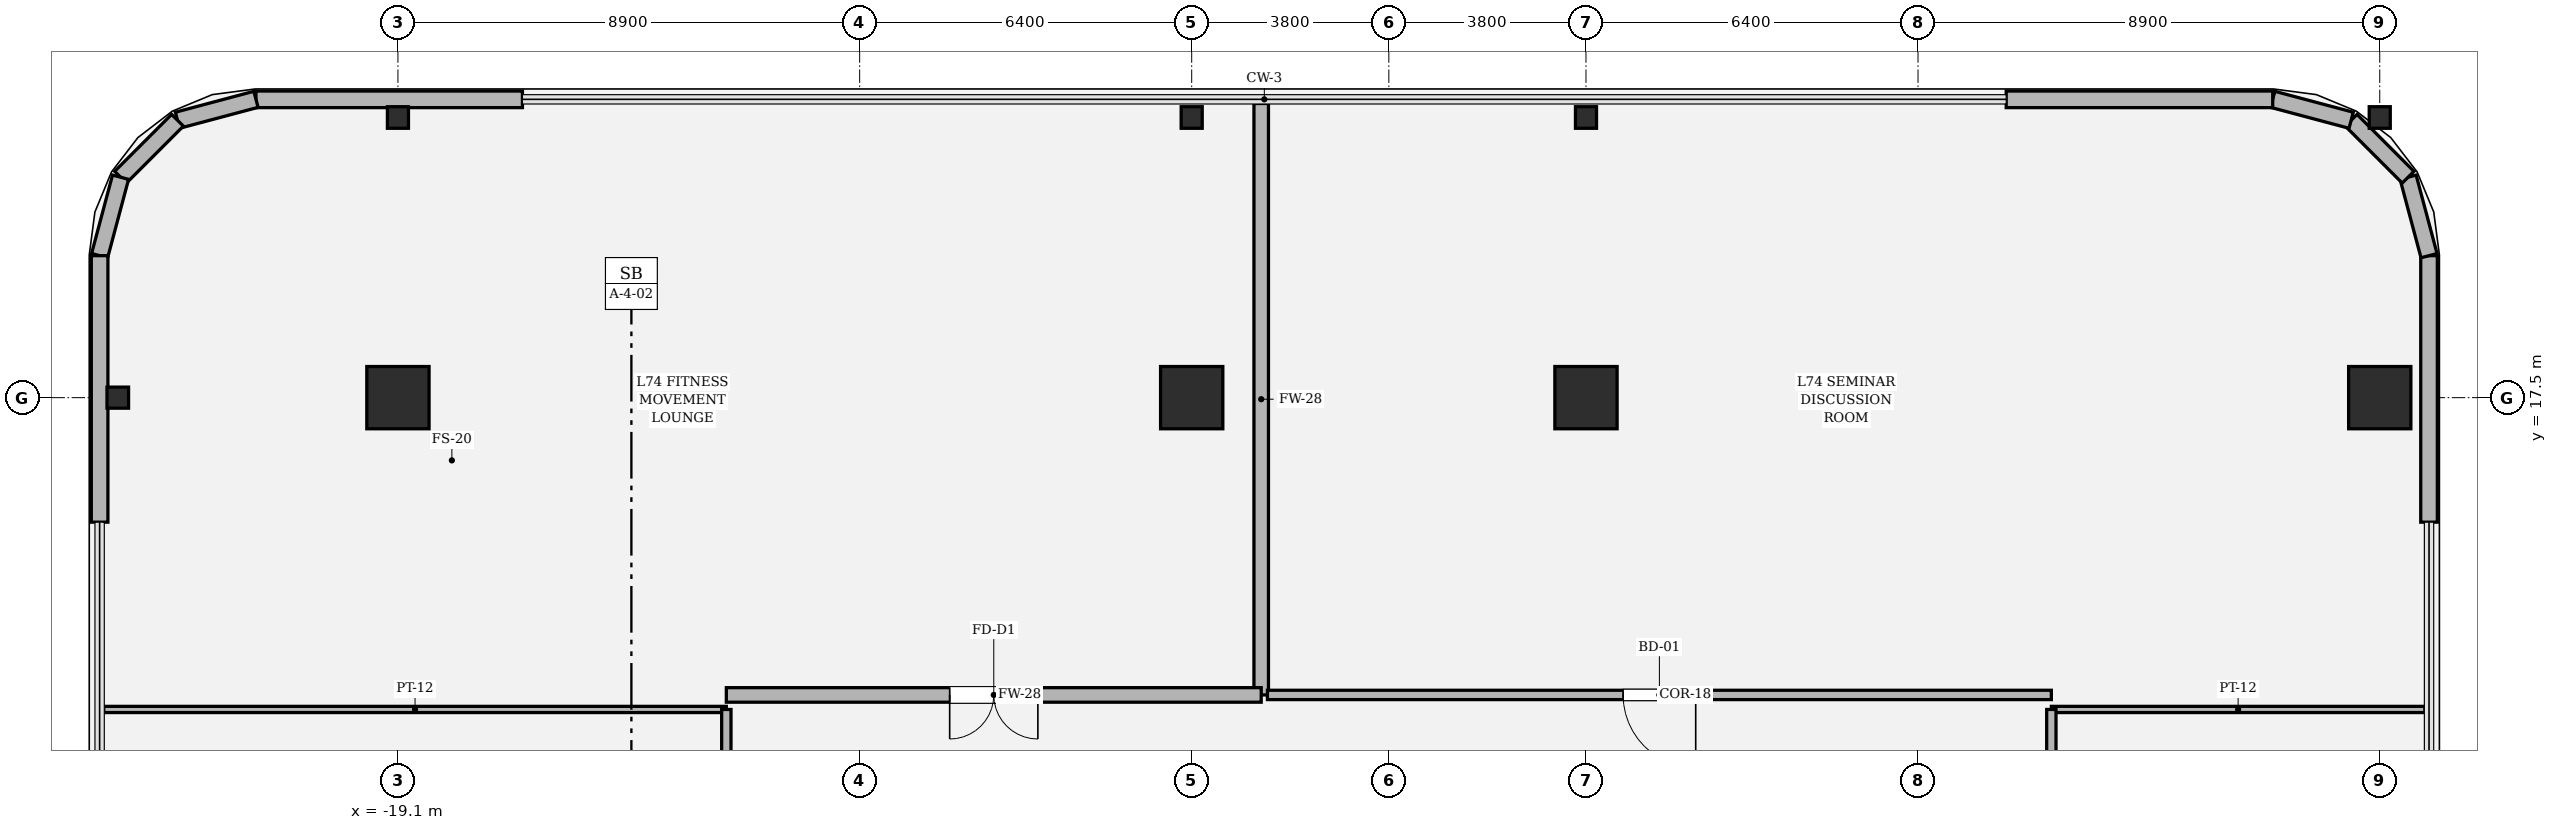
"""IFC4 building model, lengths in metres.
Left out: names, types, materials, properties, quantities, classifications, styles, units other than length and angle.
Written with IfcOpenShell. Run it as: python <this file> out.ifc"""

import sys

from ifc_helpers import new_model, si_unit, direction, frame, frame_2d, origin, origin_2d, place, context, subcontext, project, spatial, rectangle, hollow_rectangle, i_section, extrude, element, fill, save


model = new_model("IFC4")
c1 = context("Model", 3, precision=1e-05, world=origin(), true_north=direction((0.0, 1.0)))
c2 = subcontext(c1, "Body", "Model", "MODEL_VIEW")
j1 = project(units=[si_unit("LENGTHUNIT", "METRE"), si_unit("PLANEANGLEUNIT", "RADIAN")], contexts=[c1])
p1 = place(None, origin())
s1 = spatial("IfcSite", under=j1, at=p1, CompositionType="ELEMENT")
p2 = place(p1, origin())
s2 = spatial("IfcBuilding", under=s1, at=p2, CompositionType="ELEMENT")
p3 = place(p2, frame((0.0, 0.0, 313.2)))
s3 = spatial("IfcBuildingStorey", under=s2, at=p3, CompositionType="ELEMENT", Elevation=313.2)
for number, where, z_axis, x_axis in (
    (1, (19.1, 17.5, 0.0), (0.0, 0.0, 1.0), (1.0, 0.0, 0.0)),
    (2, (3.8, 17.5, 0.0), (0.0, 0.0, 1.0), (1.0, 0.0, 0.0)),
    (3, (-3.8, 17.5, 0.0), (0.0, 0.0, 1.0), (1.0, 0.0, 0.0)),
    (4, (-19.1, 17.5, 0.0), (0.0, 0.0, 1.0), (1.0, 0.0, 0.0)),
):
    element("IfcColumn", number, at=place(p3, frame(where, z_axis=z_axis, x_axis=x_axis)), inside=s3, PredefinedType="COLUMN", context=c2, shape_type="SweptSolid", body=[
        extrude(hollow_rectangle(XDim=1.2, YDim=1.2, WallThickness=0.035, at=origin_2d()), origin(), (0.0, 0.0, 1.0), 4.2),
    ])
for number, where, z_axis, x_axis in (
    (5, (-19.1, 22.9, 0.0), (0.0, 0.0, 1.0), (1.0, 0.0, 0.0)),
    (6, (-3.8, 22.9, 0.0), (0.0, 0.0, 1.0), (1.0, 0.0, 0.0)),
    (7, (3.8, 22.9, 0.0), (0.0, 0.0, 1.0), (1.0, 0.0, 0.0)),
    (8, (19.1, 22.9, 0.0), (0.0, 0.0, 1.0), (1.0, 0.0, 0.0)),
    (9, (-24.5, 17.5, 0.0), (0.0, 0.0, 1.0), (0.0, 1.0, 0.0)),
):
    element("IfcColumn", number, at=place(p3, frame(where, z_axis=z_axis, x_axis=x_axis)), inside=s3, PredefinedType="COLUMN", context=c2, shape_type="SweptSolid", body=[
        extrude(i_section(OverallWidth=0.406, OverallDepth=0.416, WebThickness=0.029, FlangeThickness=0.048, FilletRadius=0.018, at=origin_2d()), origin(), (0.0, 0.0, 1.0), 4.198),
    ])
p4 = place(p3, frame((20.05, 15.1, 0.0), z_axis=(0.0, 0.0, 1.0), x_axis=(0.0, 1.0, 0.0)))
e10 = element("IfcWall", 10, at=p4, inside=s3, PredefinedType="SOLIDWALL", context=c2, shape_type="SweptSolid", body=[
    extrude(rectangle(XDim=5.137, YDim=0.32, at=frame_2d((2.568, 0.0))), origin(), (0.0, 0.0, 1.0), 3.92),
])
p5 = place(p3, frame((20.05, 20.237, 0.0), z_axis=(0.0, 0.0, 1.0), x_axis=(-0.257847112249, 0.966185730957, 0.0)))
e11 = element("IfcWall", 11, at=p5, inside=s3, PredefinedType="SOLIDWALL", context=c2, shape_type="SweptSolid", body=[
    extrude(rectangle(XDim=1.565, YDim=0.32, at=frame_2d((0.783, 0.0))), origin(), (0.0, 0.0, 1.0), 3.92),
])
p6 = place(p3, frame((19.646, 21.749, 0.0), z_axis=(0.0, 0.0, 1.0), x_axis=(-0.707028130747, 0.707185422879, 0.0)))
e12 = element("IfcWall", 12, at=p6, inside=s3, PredefinedType="SOLIDWALL", context=c2, shape_type="SweptSolid", body=[
    extrude(rectangle(XDim=1.552, YDim=0.32, at=frame_2d((0.776, 0.0))), origin(), (0.0, 0.0, 1.0), 3.92),
])
p7 = place(p3, frame((18.549, 22.847, 0.0), z_axis=(0.0, 0.0, 1.0), x_axis=(-0.966224582397, 0.257701486942, 0.0)))
e13 = element("IfcWall", 13, at=p7, inside=s3, PredefinedType="SOLIDWALL", context=c2, shape_type="SweptSolid", body=[
    extrude(rectangle(XDim=1.565, YDim=0.32, at=frame_2d((0.783, 0.0))), origin(), (0.0, 0.0, 1.0), 3.92),
])
for number, where, z_axis, x_axis in (
    (14, (17.037, 23.25, 0.0), (0.0, 0.0, 1.0), (-1.0, 0.0, 0.0)),
    (15, (-16.7, 23.25, 0.0), (0.0, 0.0, 1.0), (-1.0, 0.0, 0.0)),
):
    element("IfcWall", number, at=place(p3, frame(where, z_axis=z_axis, x_axis=x_axis)), inside=s3, PredefinedType="SOLIDWALL", context=c2, shape_type="SweptSolid", body=[
        extrude(rectangle(XDim=5.137, YDim=0.32, at=frame_2d((2.568, 0.0))), origin(), (0.0, 0.0, 1.0), 3.92),
    ])
p8 = place(p3, frame((-21.837, 23.25, 0.0), z_axis=(0.0, 0.0, 1.0), x_axis=(-0.966224582397, -0.257701486942, 0.0)))
e16 = element("IfcWall", 16, at=p8, inside=s3, PredefinedType="SOLIDWALL", context=c2, shape_type="SweptSolid", body=[
    extrude(rectangle(XDim=1.565, YDim=0.32, at=frame_2d((0.783, 0.0))), origin(), (0.0, 0.0, 1.0), 3.92),
])
p9 = place(p3, frame((-23.349, 22.847, 0.0), z_axis=(0.0, 0.0, 1.0), x_axis=(-0.707028130747, -0.707185422879, 0.0)))
e17 = element("IfcWall", 17, at=p9, inside=s3, PredefinedType="SOLIDWALL", context=c2, shape_type="SweptSolid", body=[
    extrude(rectangle(XDim=1.552, YDim=0.32, at=frame_2d((0.776, 0.0))), origin(), (0.0, 0.0, 1.0), 3.92),
])
p10 = place(p3, frame((-24.447, 21.749, 0.0), z_axis=(0.0, 0.0, 1.0), x_axis=(-0.257847112249, -0.966185730957, 0.0)))
e18 = element("IfcWall", 18, at=p10, inside=s3, PredefinedType="SOLIDWALL", context=c2, shape_type="SweptSolid", body=[
    extrude(rectangle(XDim=1.565, YDim=0.32, at=frame_2d((0.783, 0.0))), origin(), (0.0, 0.0, 1.0), 3.92),
])
p11 = place(p3, frame((-24.85, 20.237, 0.0), z_axis=(0.0, 0.0, 1.0), x_axis=(0.0, -1.0, 0.0)))
e19 = element("IfcWall", 19, at=p11, inside=s3, PredefinedType="SOLIDWALL", context=c2, shape_type="SweptSolid", body=[
    extrude(rectangle(XDim=5.137, YDim=0.32, at=frame_2d((2.568, 0.0))), origin(), (0.0, 0.0, 1.0), 2.594),
])
p12 = place(p3, frame((-24.77, 11.49, 0.0), z_axis=(0.0, 0.0, 1.0), x_axis=(1.0, 0.0, 0.0)))
e20 = element("IfcWall", 20, at=p12, inside=s3, PredefinedType="PARTITIONING", context=c2, shape_type="SweptSolid", body=[
    extrude(rectangle(XDim=12.0, YDim=0.12, at=frame_2d((6.0, 0.0))), origin(), (0.0, 0.0, 1.0), 2.594),
])
p13 = place(p3, frame((-12.77, 11.49, 0.0), z_axis=(0.0, 0.0, 1.0), x_axis=(0.0, -1.0, 0.0)))
e21 = element("IfcWall", 21, at=p13, inside=s3, PredefinedType="PARTITIONING", context=c2, shape_type="SweptSolid", body=[
    extrude(rectangle(XDim=10.29, YDim=0.18, at=frame_2d((5.145, 0.0))), origin(), (0.0, 0.0, 1.0), 2.594),
])
p14 = place(p3, frame((12.77, 11.49, 0.0), z_axis=(0.0, 0.0, 1.0), x_axis=(1.0, 0.0, 0.0)))
e22 = element("IfcWall", 22, at=p14, inside=s3, PredefinedType="PARTITIONING", context=c2, shape_type="SweptSolid", body=[
    extrude(rectangle(XDim=7.2, YDim=0.12, at=frame_2d((3.6, 0.0))), origin(), (0.0, 0.0, 1.0), 2.594),
])
p15 = place(p3, frame((12.77, 4.218, 0.0), z_axis=(0.0, 0.0, 1.0), x_axis=(0.0, 1.0, 0.0)))
e23 = element("IfcWall", 23, at=p15, inside=s3, PredefinedType="PARTITIONING", context=c2, shape_type="SweptSolid", body=[
    extrude(rectangle(XDim=7.272, YDim=0.18, at=frame_2d((3.636, 0.0))), origin(), (0.0, 0.0, 1.0), 2.594),
])
p16 = place(p15, frame((3.111, 0.0, 0.0)))
e24 = element("IfcOpeningElement", 24, at=p16, cuts=e23, PredefinedType="OPENING", context=c2, shape_type="SweptSolid", body=[
    extrude(rectangle(XDim=1.05, YDim=2.2, at=frame_2d((0.525, 1.1))), frame((0.0, 0.1, 0.0), z_axis=(0.0, -1.0, 0.0), x_axis=(1.0, 0.0, 0.0)), (0.0, 0.0, 1.0), 0.2),
])
p17 = place(p3, frame((-2.46, 23.17, 0.0), z_axis=(0.0, 0.0, 1.0), x_axis=(0.0, -1.0, 0.0)))
e25 = element("IfcWall", 25, at=p17, inside=s3, PredefinedType="SOLIDWALL", context=c2, shape_type="SweptSolid", body=[
    extrude(rectangle(XDim=11.4, YDim=0.28, at=frame_2d((5.7, 0.0))), origin(), (0.0, 0.0, 1.0), 2.594),
])
p18 = place(p3, frame((-2.46, 11.77, 0.0), z_axis=(0.0, 0.0, 1.0), x_axis=(-1.0, 0.0, 0.0)))
e26 = element("IfcWall", 26, at=p18, inside=s3, PredefinedType="SOLIDWALL", context=c2, shape_type="SweptSolid", body=[
    extrude(rectangle(XDim=10.31, YDim=0.28, at=frame_2d((5.155, 0.0))), origin(), (0.0, 0.0, 1.0), 2.594),
])
p19 = place(p18, frame((4.305, 0.0, 0.0)))
e27 = element("IfcOpeningElement", 27, at=p19, cuts=e26, PredefinedType="OPENING", context=c2, shape_type="SweptSolid", body=[
    extrude(rectangle(XDim=1.7, YDim=2.3, at=frame_2d((0.85, 1.15))), frame((0.0, 0.15, 0.0), z_axis=(0.0, -1.0, 0.0), x_axis=(1.0, 0.0, 0.0)), (0.0, 0.0, 1.0), 0.3),
])
p20 = place(p3, frame((12.77, 11.77, 0.0), z_axis=(0.0, 0.0, 1.0), x_axis=(-1.0, 0.0, 0.0)))
e28 = element("IfcWall", 28, at=p20, inside=s3, PredefinedType="PARTITIONING", context=c2, shape_type="SweptSolid", body=[
    extrude(rectangle(XDim=15.11, YDim=0.18, at=frame_2d((7.555, 0.0))), origin(), (0.0, 0.0, 1.0), 2.594),
])
p21 = place(p20, frame((6.855, 0.0, 0.0)))
e29 = element("IfcOpeningElement", 29, at=p21, cuts=e28, PredefinedType="OPENING", context=c2, shape_type="SweptSolid", body=[
    extrude(rectangle(XDim=1.4, YDim=2.25, at=frame_2d((0.7, 1.125))), frame((0.0, 0.1, 0.0), z_axis=(0.0, -1.0, 0.0), x_axis=(1.0, 0.0, 0.0)), (0.0, 0.0, 1.0), 0.2),
])
p22 = place(p19, origin())
e30 = element("IfcDoor", 30, at=p22, inside=s3, OperationType="DOUBLE_DOOR_SINGLE_SWING", PredefinedType="DOOR", context=c2, shape_type="SweptSolid", body=[
    extrude(rectangle(XDim=1.7, YDim=2.3, at=frame_2d((0.85, 1.15))), frame((0.0, 0.025, 0.0), z_axis=(0.0, -1.0, 0.0), x_axis=(1.0, 0.0, 0.0)), (0.0, 0.0, 1.0), 0.05),
])
fill(e27, e30)
p23 = place(p21, origin())
e31 = element("IfcDoor", 31, at=p23, inside=s3, OperationType="SINGLE_SWING_LEFT", PredefinedType="DOOR", context=c2, shape_type="SweptSolid", body=[
    extrude(rectangle(XDim=1.4, YDim=2.25, at=frame_2d((0.7, 1.125))), frame((0.0, 0.025, 0.0), z_axis=(0.0, -1.0, 0.0), x_axis=(1.0, 0.0, 0.0)), (0.0, 0.0, 1.0), 0.05),
])
fill(e29, e31)
save(model, sys.argv[1])
